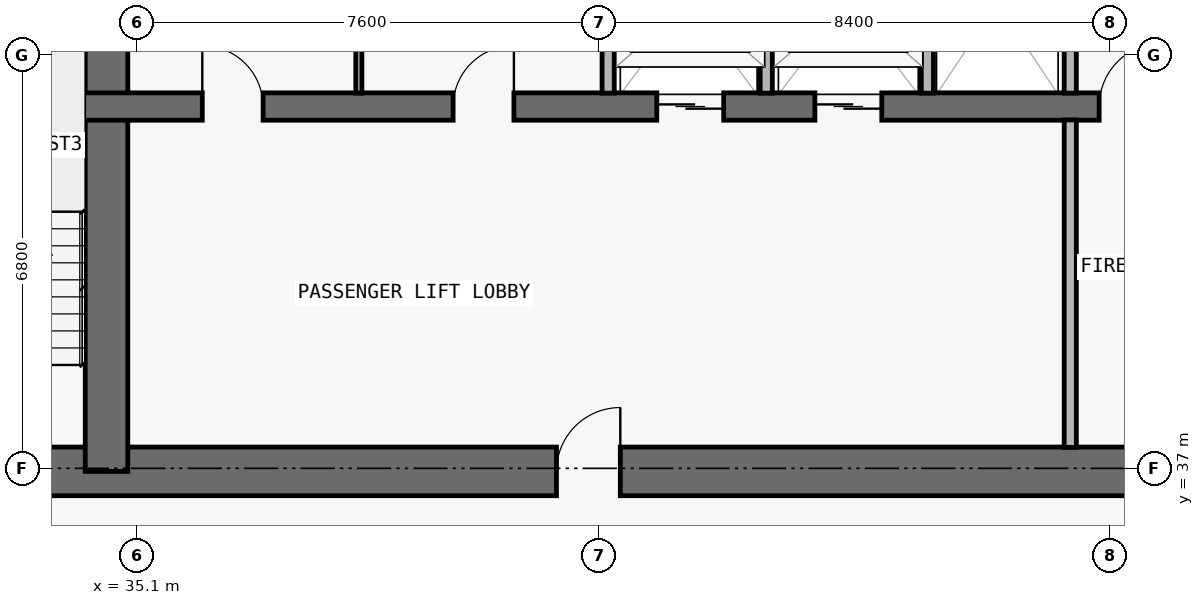
"""IFC4 building model, lengths in metres.
Left out: names, types, materials, properties, quantities, classifications, styles, units other than length and angle.
Written with IfcOpenShell. Run it as: python <this file> out.ifc"""

import sys

from ifc_helpers import new_model, si_unit, direction, frame, frame_2d, origin, place, context, subcontext, project, spatial, rectangle, extrude, element, fill, save


model = new_model("IFC4")
c1 = context("Model", 3, precision=1e-05, world=origin(), true_north=direction((0.0, 1.0)))
c2 = subcontext(c1, "Body", "Model", "MODEL_VIEW")
j1 = project(units=[si_unit("LENGTHUNIT", "METRE"), si_unit("PLANEANGLEUNIT", "RADIAN")], contexts=[c1])
p1 = place(None, origin())
s1 = spatial("IfcSite", under=j1, at=p1, CompositionType="ELEMENT")
p2 = place(p1, origin())
s2 = spatial("IfcBuilding", under=s1, at=p2, CompositionType="ELEMENT")
p3 = place(p2, frame((0.0, 0.0, 135.6)))
s3 = spatial("IfcBuildingStorey", under=s2, at=p3, CompositionType="ELEMENT", Elevation=135.6)
p4 = place(p3, frame((17.85, 36.95, 0.0), z_axis=(0.0, 0.0, 1.0), x_axis=(1.0, 0.0, 0.0)))
e1 = element("IfcWall", 1, at=p4, inside=s3, PredefinedType="SHEAR", context=c2, shape_type="SweptSolid", body=[
    extrude(rectangle(XDim=42.1, YDim=0.8, at=frame_2d((21.05, 0.0))), origin(), (0.0, 0.0, 1.0), 3.05),
])
p5 = place(p4, frame((14.45, 0.0, 0.0)))
e2 = element("IfcOpeningElement", 2, at=p5, cuts=e1, PredefinedType="OPENING", context=c2, shape_type="SweptSolid", body=[
    extrude(rectangle(XDim=1.1, YDim=2.15, at=frame_2d((0.55, 1.075))), frame((0.0, 0.41, 0.0), z_axis=(0.0, -1.0, 0.0), x_axis=(1.0, 0.0, 0.0)), (0.0, 0.0, 1.0), 0.82),
])
p6 = place(p4, frame((6.3, 0.0, 0.0)))
e3 = element("IfcOpeningElement", 3, at=p6, cuts=e1, PredefinedType="OPENING", context=c2, shape_type="SweptSolid", body=[
    extrude(rectangle(XDim=1.05, YDim=2.15, at=frame_2d((0.525, 1.075))), frame((0.0, 0.41, 0.0), z_axis=(0.0, -1.0, 0.0), x_axis=(1.0, 0.0, 0.0)), (0.0, 0.0, 1.0), 0.82),
])
p7 = place(p4, frame((34.8, 0.0, 0.0)))
e4 = element("IfcOpeningElement", 4, at=p7, cuts=e1, PredefinedType="OPENING", context=c2, shape_type="SweptSolid", body=[
    extrude(rectangle(XDim=1.05, YDim=2.15, at=frame_2d((0.525, 1.075))), frame((0.0, 0.41, 0.0), z_axis=(0.0, -1.0, 0.0), x_axis=(1.0, 0.0, 0.0)), (0.0, 0.0, 1.0), 0.82),
])
p8 = place(p4, frame((10.913, 0.0, 0.0)))
e5 = element("IfcOpeningElement", 5, at=p8, cuts=e1, PredefinedType="OPENING", context=c2, shape_type="SweptSolid", body=[
    extrude(rectangle(XDim=1.05, YDim=2.15, at=frame_2d((0.525, 1.075))), frame((0.0, 0.41, 0.0), z_axis=(0.0, -1.0, 0.0), x_axis=(1.0, 0.0, 0.0)), (0.0, 0.0, 1.0), 0.82),
])
p9 = place(p4, frame((24.15, 0.0, 0.0)))
e6 = element("IfcOpeningElement", 6, at=p9, cuts=e1, PredefinedType="OPENING", context=c2, shape_type="SweptSolid", body=[
    extrude(rectangle(XDim=1.05, YDim=2.15, at=frame_2d((0.525, 1.075))), frame((0.0, 0.41, 0.0), z_axis=(0.0, -1.0, 0.0), x_axis=(1.0, 0.0, 0.0)), (0.0, 0.0, 1.0), 0.82),
])
p10 = place(p3, frame((34.6, 36.95, 0.0), z_axis=(0.0, 0.0, 1.0), x_axis=(0.0, 1.0, 0.0)))
e7 = element("IfcWall", 7, at=p10, inside=s3, PredefinedType="SHEAR", context=c2, shape_type="SweptSolid", body=[
    extrude(rectangle(XDim=9.625, YDim=0.7, at=frame_2d((4.812, 0.0))), origin(), (0.0, 0.0, 1.0), 3.05),
])
p11 = place(p3, frame((22.25, 42.95, 0.0), z_axis=(0.0, 0.0, 1.0), x_axis=(1.0, 0.0, 0.0)))
e8 = element("IfcWall", 8, at=p11, inside=s3, PredefinedType="SHEAR", context=c2, shape_type="SweptSolid", body=[
    extrude(rectangle(XDim=33.3, YDim=0.45, at=frame_2d((16.65, 0.0))), origin(), (0.0, 0.0, 1.0), 3.05),
])
p12 = place(p11, frame((1.05, 0.0, 0.0)))
e9 = element("IfcOpeningElement", 9, at=p12, cuts=e8, PredefinedType="OPENING", context=c2, shape_type="SweptSolid", body=[
    extrude(rectangle(XDim=1.2, YDim=2.2, at=frame_2d((0.6, 1.1))), frame((0.0, 0.235, 0.0), z_axis=(0.0, -1.0, 0.0), x_axis=(1.0, 0.0, 0.0)), (0.0, 0.0, 1.0), 0.47),
])
p13 = place(p11, frame((31.05, 0.0, 0.0)))
e10 = element("IfcOpeningElement", 10, at=p13, cuts=e8, PredefinedType="OPENING", context=c2, shape_type="SweptSolid", body=[
    extrude(rectangle(XDim=1.2, YDim=2.2, at=frame_2d((0.6, 1.1))), frame((0.0, 0.235, 0.0), z_axis=(0.0, -1.0, 0.0), x_axis=(1.0, 0.0, 0.0)), (0.0, 0.0, 1.0), 0.47),
])
p14 = place(p11, frame((21.4, 0.0, 0.0)))
e11 = element("IfcOpeningElement", 11, at=p14, cuts=e8, PredefinedType="OPENING", context=c2, shape_type="SweptSolid", body=[
    extrude(rectangle(XDim=1.1, YDim=2.2, at=frame_2d((0.55, 1.1))), frame((0.0, 0.235, 0.0), z_axis=(0.0, -1.0, 0.0), x_axis=(1.0, 0.0, 0.0)), (0.0, 0.0, 1.0), 0.47),
])
p15 = place(p11, frame((24.0, 0.0, 0.0)))
e12 = element("IfcOpeningElement", 12, at=p15, cuts=e8, PredefinedType="OPENING", context=c2, shape_type="SweptSolid", body=[
    extrude(rectangle(XDim=1.1, YDim=2.2, at=frame_2d((0.55, 1.1))), frame((0.0, 0.235, 0.0), z_axis=(0.0, -1.0, 0.0), x_axis=(1.0, 0.0, 0.0)), (0.0, 0.0, 1.0), 0.47),
])
p16 = place(p11, frame((3.625, 0.0, 0.0)))
e13 = element("IfcOpeningElement", 13, at=p16, cuts=e8, PredefinedType="OPENING", context=c2, shape_type="SweptSolid", body=[
    extrude(rectangle(XDim=1.05, YDim=2.15, at=frame_2d((0.525, 1.075))), frame((0.0, 0.235, 0.0), z_axis=(0.0, -1.0, 0.0), x_axis=(1.0, 0.0, 0.0)), (0.0, 0.0, 1.0), 0.47),
])
p17 = place(p11, frame((28.675, 0.0, 0.0)))
e14 = element("IfcOpeningElement", 14, at=p17, cuts=e8, PredefinedType="OPENING", context=c2, shape_type="SweptSolid", body=[
    extrude(rectangle(XDim=1.05, YDim=2.15, at=frame_2d((0.525, 1.075))), frame((0.0, 0.235, 0.0), z_axis=(0.0, -1.0, 0.0), x_axis=(1.0, 0.0, 0.0)), (0.0, 0.0, 1.0), 0.47),
])
p18 = place(p11, frame((13.925, 0.0, 0.0)))
e15 = element("IfcOpeningElement", 15, at=p18, cuts=e8, PredefinedType="OPENING", context=c2, shape_type="SweptSolid", body=[
    extrude(rectangle(XDim=1.0, YDim=2.2, at=frame_2d((0.5, 1.1))), frame((0.0, 0.235, 0.0), z_axis=(0.0, -1.0, 0.0), x_axis=(1.0, 0.0, 0.0)), (0.0, 0.0, 1.0), 0.47),
])
p19 = place(p11, frame((18.05, 0.0, 0.0)))
e16 = element("IfcOpeningElement", 16, at=p19, cuts=e8, PredefinedType="OPENING", context=c2, shape_type="SweptSolid", body=[
    extrude(rectangle(XDim=1.0, YDim=2.2, at=frame_2d((0.5, 1.1))), frame((0.0, 0.235, 0.0), z_axis=(0.0, -1.0, 0.0), x_axis=(1.0, 0.0, 0.0)), (0.0, 0.0, 1.0), 0.47),
])
p20 = place(p3, frame((38.75, 43.17, 0.0), z_axis=(0.0, 0.0, 1.0), x_axis=(0.0, 1.0, 0.0)))
e17 = element("IfcWall", 17, at=p20, inside=s3, PredefinedType="MOVABLE", context=c2, shape_type="SweptSolid", body=[
    extrude(rectangle(XDim=3.185, YDim=0.1, at=frame_2d((1.593, 0.0))), origin(), (0.0, 0.0, 1.0), 3.05),
])
for number, where, z_axis, x_axis in (
    (18, (42.85, 43.17, 0.0), (0.0, 0.0, 1.0), (0.0, 1.0, 0.0)),
    (19, (45.45, 43.17, 0.0), (0.0, 0.0, 1.0), (0.0, 1.0, 0.0)),
    (20, (48.1, 43.17, 0.0), (0.0, 0.0, 1.0), (0.0, 1.0, 0.0)),
):
    element("IfcWall", number, at=place(p3, frame(where, z_axis=z_axis, x_axis=x_axis)), inside=s3, PredefinedType="PARTITIONING", context=c2, shape_type="SweptSolid", body=[
        extrude(rectangle(XDim=3.185, YDim=0.2, at=frame_2d((1.593, 0.0))), origin(), (0.0, 0.0, 1.0), 3.05),
    ])
p21 = place(p3, frame((50.45, 37.345, 0.0), z_axis=(0.0, 0.0, 1.0), x_axis=(0.0, 1.0, 0.0)))
e21 = element("IfcWall", 21, at=p21, inside=s3, PredefinedType="PARTITIONING", context=c2, shape_type="SweptSolid", body=[
    extrude(rectangle(XDim=5.385, YDim=0.2, at=frame_2d((2.692, 0.0))), origin(), (0.0, 0.0, 1.0), 3.05),
])
p22 = place(p3, frame((50.45, 43.17, 0.0), z_axis=(0.0, 0.0, 1.0), x_axis=(0.0, 1.0, 0.0)))
e22 = element("IfcWall", 22, at=p22, inside=s3, PredefinedType="PARTITIONING", context=c2, shape_type="SweptSolid", body=[
    extrude(rectangle(XDim=3.185, YDim=0.2, at=frame_2d((1.593, 0.0))), origin(), (0.0, 0.0, 1.0), 3.05),
])
p23 = place(p14, origin())
e23 = element("IfcDoor", 23, at=p23, inside=s3, OperationType="DOUBLE_DOOR_SLIDING", PredefinedType="DOOR", context=c2, shape_type="SweptSolid", body=[
    extrude(rectangle(XDim=1.1, YDim=2.2, at=frame_2d((0.55, 1.1))), frame((0.0, 0.025, 0.0), z_axis=(0.0, -1.0, 0.0), x_axis=(1.0, 0.0, 0.0)), (0.0, 0.0, 1.0), 0.05),
])
fill(e11, e23)
p24 = place(p15, origin())
e24 = element("IfcDoor", 24, at=p24, inside=s3, OperationType="DOUBLE_DOOR_SLIDING", PredefinedType="DOOR", context=c2, shape_type="SweptSolid", body=[
    extrude(rectangle(XDim=1.1, YDim=2.2, at=frame_2d((0.55, 1.1))), frame((0.0, 0.025, 0.0), z_axis=(0.0, -1.0, 0.0), x_axis=(1.0, 0.0, 0.0)), (0.0, 0.0, 1.0), 0.05),
])
fill(e12, e24)
p25 = place(p17, origin())
e25 = element("IfcDoor", 25, at=p25, inside=s3, OperationType="SINGLE_SWING_RIGHT", PredefinedType="DOOR", context=c2, shape_type="SweptSolid", body=[
    extrude(rectangle(XDim=1.05, YDim=2.15, at=frame_2d((0.525, 1.075))), frame((0.0, 0.025, 0.0), z_axis=(0.0, -1.0, 0.0), x_axis=(1.0, 0.0, 0.0)), (0.0, 0.0, 1.0), 0.05),
])
fill(e14, e25)
p26 = place(p9, origin())
e26 = element("IfcDoor", 26, at=p26, inside=s3, OperationType="SINGLE_SWING_RIGHT", PredefinedType="DOOR", context=c2, shape_type="SweptSolid", body=[
    extrude(rectangle(XDim=1.05, YDim=2.15, at=frame_2d((0.525, 1.075))), frame((0.0, 0.025, 0.0), z_axis=(0.0, -1.0, 0.0), x_axis=(1.0, 0.0, 0.0)), (0.0, 0.0, 1.0), 0.05),
])
fill(e6, e26)
p27 = place(p18, origin())
e27 = element("IfcDoor", 27, at=p27, inside=s3, OperationType="SINGLE_SWING_LEFT", PredefinedType="DOOR", context=c2, shape_type="SweptSolid", body=[
    extrude(rectangle(XDim=1.0, YDim=2.2, at=frame_2d((0.5, 1.1))), frame((0.0, 0.025, 0.0), z_axis=(0.0, -1.0, 0.0), x_axis=(1.0, 0.0, 0.0)), (0.0, 0.0, 1.0), 0.05),
])
fill(e15, e27)
p28 = place(p19, origin())
e28 = element("IfcDoor", 28, at=p28, inside=s3, OperationType="SINGLE_SWING_RIGHT", PredefinedType="DOOR", context=c2, shape_type="SweptSolid", body=[
    extrude(rectangle(XDim=1.0, YDim=2.2, at=frame_2d((0.5, 1.1))), frame((0.0, 0.025, 0.0), z_axis=(0.0, -1.0, 0.0), x_axis=(1.0, 0.0, 0.0)), (0.0, 0.0, 1.0), 0.05),
])
fill(e16, e28)
save(model, sys.argv[1])
